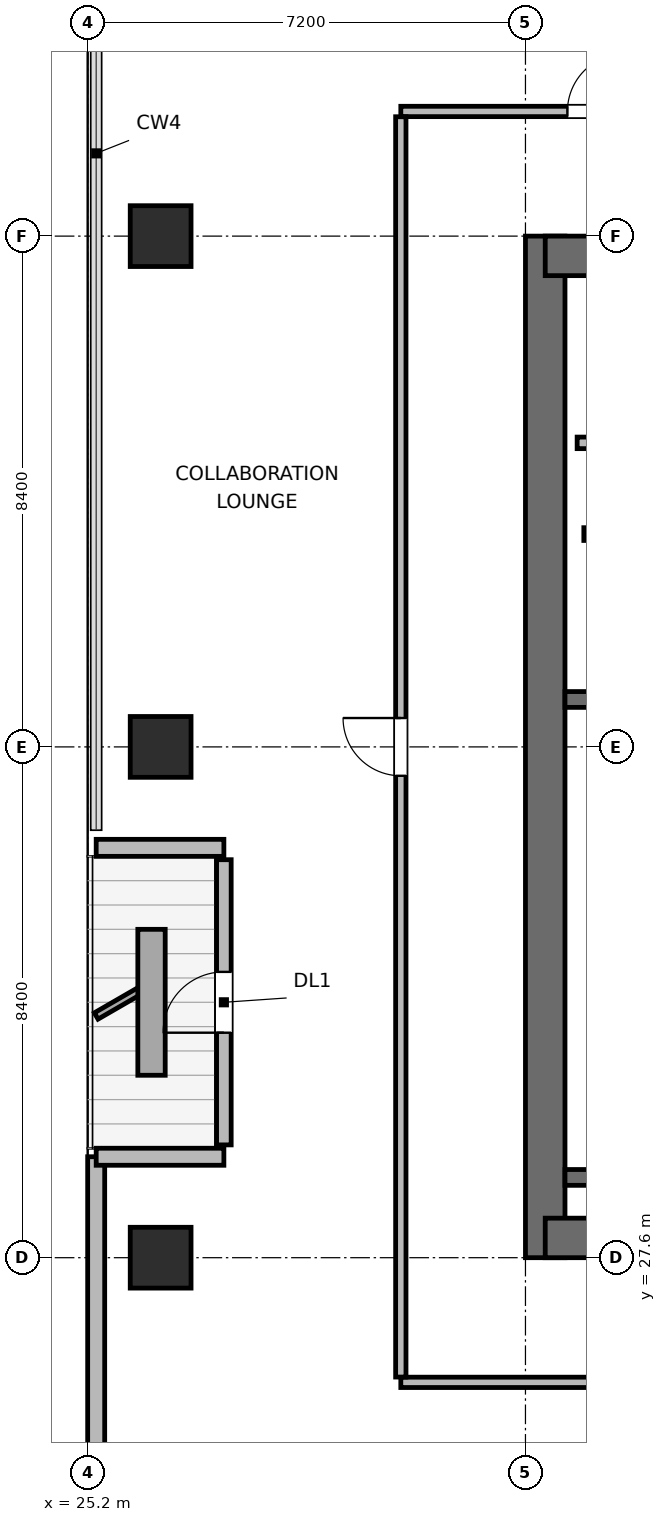
"""IFC4 building model, lengths in metres.
Left out: names, types, materials, properties, quantities, classifications, styles, units other than length and angle.
Written with IfcOpenShell. Run it as: python <this file> out.ifc"""

import sys

from ifc_helpers import new_model, si_unit, direction, frame, frame_2d, origin, origin_2d, place, context, subcontext, project, spatial, rectangle, extrude, element, fill, save


model = new_model("IFC4")
c1 = context("Model", 3, precision=1e-05, world=origin(), true_north=direction((0.0, 1.0)))
c2 = subcontext(c1, "Body", "Model", "MODEL_VIEW")
j1 = project(units=[si_unit("LENGTHUNIT", "METRE"), si_unit("PLANEANGLEUNIT", "RADIAN")], contexts=[c1])
p1 = place(None, origin())
s1 = spatial("IfcSite", under=j1, at=p1, CompositionType="ELEMENT")
p2 = place(p1, origin())
s2 = spatial("IfcBuilding", under=s1, at=p2, CompositionType="ELEMENT")
p3 = place(p2, frame((0.0, 0.0, 231.0)))
s3 = spatial("IfcBuildingStorey", under=s2, at=p3, CompositionType="ELEMENT", Elevation=231.0)
p4 = place(p3, frame((32.725, 27.6, 0.0), z_axis=(0.0, 0.0, 1.0), x_axis=(0.0, 1.0, 0.0)))
e1 = element("IfcWall", 1, at=p4, inside=s3, PredefinedType="SHEAR", context=c2, shape_type="SweptSolid", body=[
    extrude(rectangle(XDim=16.8, YDim=0.65, at=frame_2d((8.4, 0.0))), origin(), (0.0, 0.0, 1.0), 3.9),
])
p5 = place(p3, frame((32.725, 27.925, 0.0), z_axis=(0.0, 0.0, 1.0), x_axis=(1.0, 0.0, 0.0)))
e2 = element("IfcWall", 2, at=p5, inside=s3, PredefinedType="SHEAR", context=c2, shape_type="SweptSolid", body=[
    extrude(rectangle(XDim=9.35, YDim=0.65, at=frame_2d((4.675, 0.0))), origin(), (0.0, 0.0, 1.0), 3.9),
])
p6 = place(p5, frame((5.025, 0.0, 0.0)))
e3 = element("IfcOpeningElement", 3, at=p6, cuts=e2, PredefinedType="OPENING", context=c2, shape_type="SweptSolid", body=[
    extrude(rectangle(XDim=1.05, YDim=2.04, at=frame_2d((0.525, 1.02))), frame((0.0, 0.335, 0.0), z_axis=(0.0, -1.0, 0.0), x_axis=(1.0, 0.0, 0.0)), (0.0, 0.0, 1.0), 0.67),
])
p7 = place(p3, frame((32.725, 44.075, 0.0), z_axis=(0.0, 0.0, 1.0), x_axis=(1.0, 0.0, 0.0)))
e4 = element("IfcWall", 4, at=p7, inside=s3, PredefinedType="SHEAR", context=c2, shape_type="SweptSolid", body=[
    extrude(rectangle(XDim=9.35, YDim=0.65, at=frame_2d((4.675, 0.0))), origin(), (0.0, 0.0, 1.0), 3.9),
])
p8 = place(p7, frame((1.025, 0.0, 0.0)))
e5 = element("IfcOpeningElement", 5, at=p8, cuts=e4, PredefinedType="OPENING", context=c2, shape_type="SweptSolid", body=[
    extrude(rectangle(XDim=0.95, YDim=2.04, at=frame_2d((0.475, 1.02))), frame((0.0, 0.335, 0.0), z_axis=(0.0, -1.0, 0.0), x_axis=(1.0, 0.0, 0.0)), (0.0, 0.0, 1.0), 0.67),
])
p9 = place(p7, frame((4.275, 0.0, 0.0)))
e6 = element("IfcOpeningElement", 6, at=p9, cuts=e4, PredefinedType="OPENING", context=c2, shape_type="SweptSolid", body=[
    extrude(rectangle(XDim=0.9, YDim=2.02, at=frame_2d((0.45, 1.01))), frame((0.0, 0.335, 0.0), z_axis=(0.0, -1.0, 0.0), x_axis=(1.0, 0.0, 0.0)), (0.0, 0.0, 1.0), 0.67),
])
p10 = place(p7, frame((7.175, 0.0, 0.0)))
e7 = element("IfcOpeningElement", 7, at=p10, cuts=e4, PredefinedType="OPENING", context=c2, shape_type="SweptSolid", body=[
    extrude(rectangle(XDim=0.9, YDim=2.02, at=frame_2d((0.45, 1.01))), frame((0.0, 0.335, 0.0), z_axis=(0.0, -1.0, 0.0), x_axis=(1.0, 0.0, 0.0)), (0.0, 0.0, 1.0), 0.67),
])
for number, where, z_axis, x_axis in (
    (8, (33.05, 28.92, 0.0), (0.0, 0.0, 1.0), (1.0, 0.0, 0.0)),
    (9, (33.05, 36.78, 0.0), (0.0, 0.0, 1.0), (1.0, 0.0, 0.0)),
):
    element("IfcWall", number, at=place(p3, frame(where, z_axis=z_axis, x_axis=x_axis)), inside=s3, PredefinedType="SHEAR", context=c2, shape_type="SweptSolid", body=[
        extrude(rectangle(XDim=4.06, YDim=0.26, at=frame_2d((2.03, 0.0))), origin(), (0.0, 0.0, 1.0), 3.9),
    ])
for number, where, z_axis, x_axis in (
    (10, (26.4, 27.6, 0.0), (0.0, 0.0, 1.0), (1.0, 0.0, 0.0)),
    (11, (26.4, 36.0, 0.0), (0.0, 0.0, 1.0), (1.0, 0.0, 0.0)),
    (12, (26.4, 44.4, 0.0), (0.0, 0.0, 1.0), (1.0, 0.0, 0.0)),
):
    element("IfcColumn", number, at=place(p3, frame(where, z_axis=z_axis, x_axis=x_axis)), inside=s3, PredefinedType="COLUMN", context=c2, shape_type="SweptSolid", body=[
        extrude(rectangle(XDim=1.0, YDim=1.0, at=origin_2d()), origin(), (0.0, 0.0, 1.0), 3.9),
    ])
p11 = place(p3, frame((25.34, 23.818, 0.0), z_axis=(0.0, 0.0, 1.0), x_axis=(0.0, 1.0, 0.0)))
e13 = element("IfcWall", 13, at=p11, inside=s3, PredefinedType="SOLIDWALL", context=c2, shape_type="SweptSolid", body=[
    extrude(rectangle(XDim=5.442, YDim=0.28, at=frame_2d((2.721, 0.0))), origin(), (0.0, 0.0, 1.0), 3.68),
])
p12 = place(p3, frame((25.34, 29.26, 0.0), z_axis=(0.0, 0.0, 1.0), x_axis=(1.0, 0.0, 0.0)))
e14 = element("IfcWall", 14, at=p12, inside=s3, PredefinedType="SOLIDWALL", context=c2, shape_type="SweptSolid", body=[
    extrude(rectangle(XDim=2.1, YDim=0.28, at=frame_2d((1.05, 0.0))), origin(), (0.0, 0.0, 1.0), 3.116),
])
p13 = place(p3, frame((27.44, 29.455, 0.0), z_axis=(0.0, 0.0, 1.0), x_axis=(0.0, 1.0, 0.0)))
e15 = element("IfcWall", 15, at=p13, inside=s3, PredefinedType="SOLIDWALL", context=c2, shape_type="SweptSolid", body=[
    extrude(rectangle(XDim=4.69, YDim=0.24, at=frame_2d((2.345, 0.0))), origin(), (0.0, 0.0, 1.0), 3.248),
])
p14 = place(p13, frame((1.845, 0.0, 0.0)))
e16 = element("IfcOpeningElement", 16, at=p14, cuts=e15, PredefinedType="OPENING", context=c2, shape_type="SweptSolid", body=[
    extrude(rectangle(XDim=1.0, YDim=2.02, at=frame_2d((0.5, 1.01))), frame((0.0, 0.13, 0.0), z_axis=(0.0, -1.0, 0.0), x_axis=(1.0, 0.0, 0.0)), (0.0, 0.0, 1.0), 0.26),
])
p15 = place(p3, frame((27.44, 34.34, 0.0), z_axis=(0.0, 0.0, 1.0), x_axis=(-1.0, 0.0, 0.0)))
e17 = element("IfcWall", 17, at=p15, inside=s3, PredefinedType="SOLIDWALL", context=c2, shape_type="SweptSolid", body=[
    extrude(rectangle(XDim=2.1, YDim=0.28, at=frame_2d((1.05, 0.0))), origin(), (0.0, 0.0, 1.0), 3.116),
])
p16 = place(p3, frame((33.25, 41.0, 0.0), z_axis=(0.0, 0.0, 1.0), x_axis=(1.0, 0.0, 0.0)))
e18 = element("IfcWall", 18, at=p16, inside=s3, PredefinedType="PLUMBINGWALL", context=c2, shape_type="SweptSolid", body=[
    extrude(rectangle(XDim=8.3, YDim=0.19, at=frame_2d((4.15, 0.0))), origin(), (0.0, 0.0, 1.0), 3.68),
])
p17 = place(p3, frame((33.36, 39.5, 0.0), z_axis=(0.0, 0.0, 1.0), x_axis=(1.0, 0.0, 0.0)))
e19 = element("IfcWall", 19, at=p17, inside=s3, PredefinedType="PARTITIONING", context=c2, shape_type="SweptSolid", body=[
    extrude(rectangle(XDim=1.86, YDim=0.21, at=frame_2d((0.93, 0.0))), origin(), (0.0, 0.0, 1.0), 3.68),
])
p18 = place(p3, frame((30.35, 25.55, 0.0), z_axis=(0.0, 0.0, 1.0), x_axis=(1.0, 0.0, 0.0)))
e20 = element("IfcWall", 20, at=p18, inside=s3, PredefinedType="PARTITIONING", context=c2, shape_type="SweptSolid", body=[
    extrude(rectangle(XDim=33.25, YDim=0.17, at=frame_2d((16.625, 0.0))), origin(), (0.0, 0.0, 1.0), 3.68),
])
p19 = place(p18, frame((5.265, 0.0, 0.0)))
e21 = element("IfcOpeningElement", 21, at=p19, cuts=e20, PredefinedType="OPENING", context=c2, shape_type="SweptSolid", body=[
    extrude(rectangle(XDim=0.95, YDim=2.04, at=frame_2d((0.475, 1.02))), frame((0.0, 0.095, 0.0), z_axis=(0.0, -1.0, 0.0), x_axis=(1.0, 0.0, 0.0)), (0.0, 0.0, 1.0), 0.19),
])
p20 = place(p18, frame((16.15, 0.0, 0.0)))
e22 = element("IfcOpeningElement", 22, at=p20, cuts=e20, PredefinedType="OPENING", context=c2, shape_type="SweptSolid", body=[
    extrude(rectangle(XDim=0.95, YDim=2.04, at=frame_2d((0.475, 1.02))), frame((0.0, 0.095, 0.0), z_axis=(0.0, -1.0, 0.0), x_axis=(1.0, 0.0, 0.0)), (0.0, 0.0, 1.0), 0.19),
])
p21 = place(p18, frame((27.035, 0.0, 0.0)))
e23 = element("IfcOpeningElement", 23, at=p21, cuts=e20, PredefinedType="OPENING", context=c2, shape_type="SweptSolid", body=[
    extrude(rectangle(XDim=0.95, YDim=2.04, at=frame_2d((0.475, 1.02))), frame((0.0, 0.095, 0.0), z_axis=(0.0, -1.0, 0.0), x_axis=(1.0, 0.0, 0.0)), (0.0, 0.0, 1.0), 0.19),
])
p22 = place(p3, frame((30.35, 46.45, 0.0), z_axis=(0.0, 0.0, 1.0), x_axis=(1.0, 0.0, 0.0)))
e24 = element("IfcWall", 24, at=p22, inside=s3, PredefinedType="PARTITIONING", context=c2, shape_type="SweptSolid", body=[
    extrude(rectangle(XDim=33.25, YDim=0.17, at=frame_2d((16.625, 0.0))), origin(), (0.0, 0.0, 1.0), 3.68),
])
p23 = place(p22, frame((2.74, 0.0, 0.0)))
e25 = element("IfcOpeningElement", 25, at=p23, cuts=e24, PredefinedType="OPENING", context=c2, shape_type="SweptSolid", body=[
    extrude(rectangle(XDim=0.95, YDim=2.04, at=frame_2d((0.475, 1.02))), frame((0.0, 0.095, 0.0), z_axis=(0.0, -1.0, 0.0), x_axis=(1.0, 0.0, 0.0)), (0.0, 0.0, 1.0), 0.19),
])
p24 = place(p22, frame((14.255, 0.0, 0.0)))
e26 = element("IfcOpeningElement", 26, at=p24, cuts=e24, PredefinedType="OPENING", context=c2, shape_type="SweptSolid", body=[
    extrude(rectangle(XDim=0.95, YDim=2.04, at=frame_2d((0.475, 1.02))), frame((0.0, 0.095, 0.0), z_axis=(0.0, -1.0, 0.0), x_axis=(1.0, 0.0, 0.0)), (0.0, 0.0, 1.0), 0.19),
])
p25 = place(p22, frame((27.665, 0.0, 0.0)))
e27 = element("IfcOpeningElement", 27, at=p25, cuts=e24, PredefinedType="OPENING", context=c2, shape_type="SweptSolid", body=[
    extrude(rectangle(XDim=0.95, YDim=2.04, at=frame_2d((0.475, 1.02))), frame((0.0, 0.095, 0.0), z_axis=(0.0, -1.0, 0.0), x_axis=(1.0, 0.0, 0.0)), (0.0, 0.0, 1.0), 0.19),
])
p26 = place(p3, frame((30.35, 25.637, 0.0), z_axis=(0.0, 0.0, 1.0), x_axis=(0.0, 1.0, 0.0)))
e28 = element("IfcWall", 28, at=p26, inside=s3, PredefinedType="PARTITIONING", context=c2, shape_type="SweptSolid", body=[
    extrude(rectangle(XDim=20.726, YDim=0.17, at=frame_2d((10.363, 0.0))), origin(), (0.0, 0.0, 1.0), 3.68),
])
p27 = place(p26, frame((9.888, 0.0, 0.0)))
e29 = element("IfcOpeningElement", 29, at=p27, cuts=e28, PredefinedType="OPENING", context=c2, shape_type="SweptSolid", body=[
    extrude(rectangle(XDim=0.95, YDim=2.04, at=frame_2d((0.475, 1.02))), frame((0.0, 0.095, 0.0), z_axis=(0.0, -1.0, 0.0), x_axis=(1.0, 0.0, 0.0)), (0.0, 0.0, 1.0), 0.19),
])
p28 = place(p14, origin())
e30 = element("IfcDoor", 30, at=p28, inside=s3, OperationType="SINGLE_SWING_LEFT", PredefinedType="DOOR", context=c2, shape_type="SweptSolid", body=[
    extrude(rectangle(XDim=1.0, YDim=2.02, at=frame_2d((0.5, 1.01))), frame((0.0, 0.025, 0.0), z_axis=(0.0, -1.0, 0.0), x_axis=(1.0, 0.0, 0.0)), (0.0, 0.0, 1.0), 0.05),
])
fill(e16, e30)
p29 = place(p23, origin())
e31 = element("IfcDoor", 31, at=p29, inside=s3, OperationType="SINGLE_SWING_RIGHT", PredefinedType="DOOR", context=c2, shape_type="SweptSolid", body=[
    extrude(rectangle(XDim=0.95, YDim=2.04, at=frame_2d((0.475, 1.02))), frame((0.0, 0.025, 0.0), z_axis=(0.0, -1.0, 0.0), x_axis=(1.0, 0.0, 0.0)), (0.0, 0.0, 1.0), 0.05),
])
fill(e25, e31)
p30 = place(p27, origin())
e32 = element("IfcDoor", 32, at=p30, inside=s3, OperationType="SINGLE_SWING_RIGHT", PredefinedType="DOOR", context=c2, shape_type="SweptSolid", body=[
    extrude(rectangle(XDim=0.95, YDim=2.04, at=frame_2d((0.475, 1.02))), frame((0.0, 0.025, 0.0), z_axis=(0.0, -1.0, 0.0), x_axis=(1.0, 0.0, 0.0)), (0.0, 0.0, 1.0), 0.05),
])
fill(e29, e32)
save(model, sys.argv[1])
